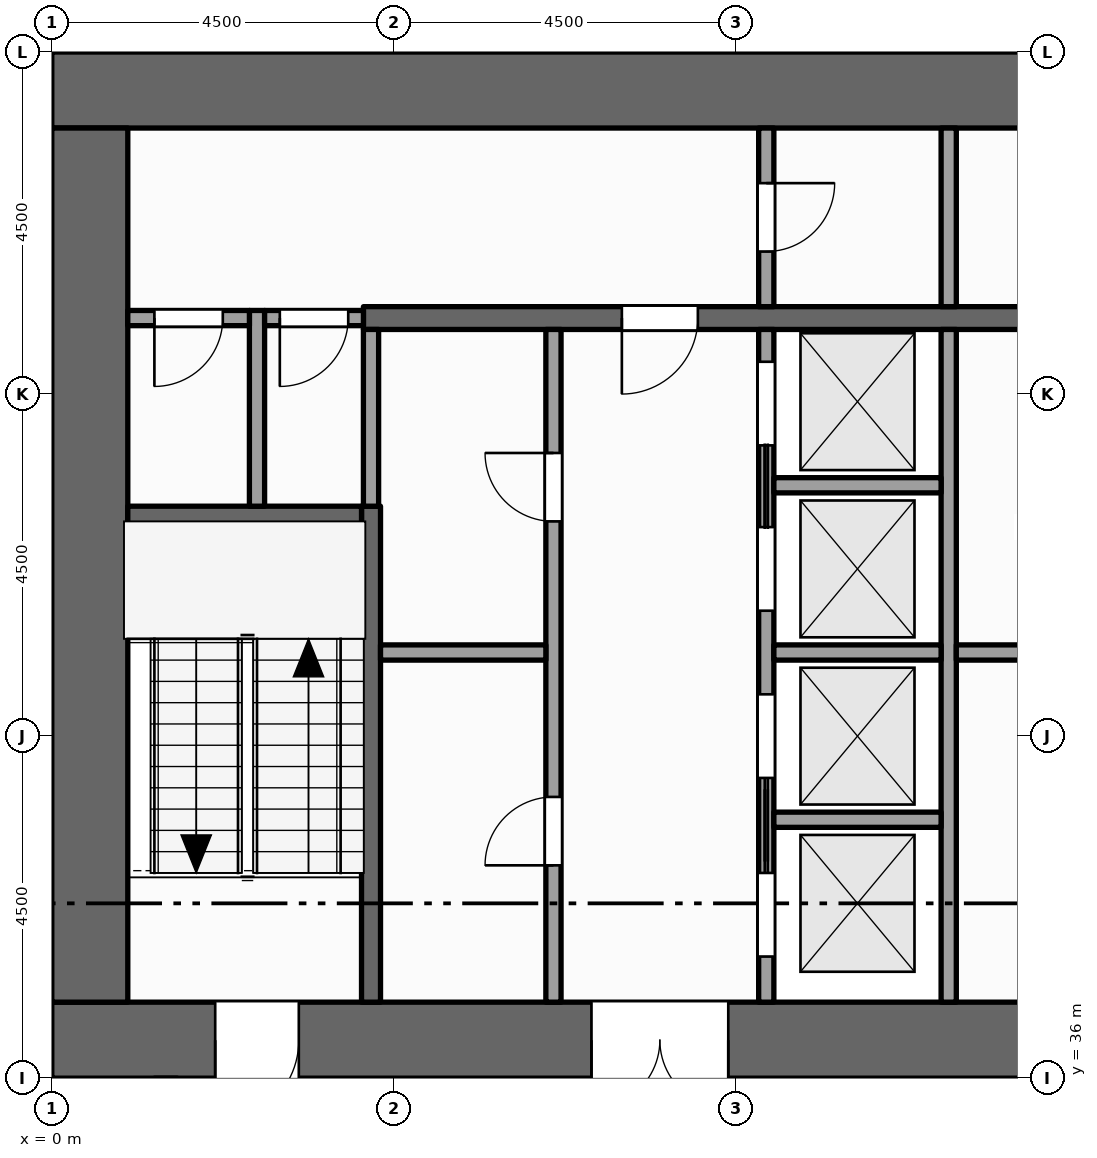
"""IFC4 building model, lengths in metres.
Left out: names, types, materials, properties, quantities, classifications, styles, units other than length and angle.
Written with IfcOpenShell. Run it as: python <this file> out.ifc"""

import sys

from ifc_helpers import new_model, si_unit, direction, frame, frame_2d, origin, place, context, subcontext, project, spatial, rectangle, extrude, element, fill, save


model = new_model("IFC4")
c1 = context("Model", 3, precision=1e-05, world=origin(), true_north=direction((0.0, 1.0)))
c2 = subcontext(c1, "Body", "Model", "MODEL_VIEW")
j1 = project(units=[si_unit("LENGTHUNIT", "METRE"), si_unit("PLANEANGLEUNIT", "RADIAN")], contexts=[c1])
p1 = place(None, origin())
s1 = spatial("IfcSite", under=j1, at=p1, CompositionType="ELEMENT")
p2 = place(p1, origin())
s2 = spatial("IfcBuilding", under=s1, at=p2, CompositionType="ELEMENT")
p3 = place(p2, frame((0.0, 0.0, 199.0)))
s3 = spatial("IfcBuildingStorey", under=s2, at=p3, CompositionType="ELEMENT", Elevation=199.0)
p4 = place(p3, frame((0.0, 36.5, -0.15), z_axis=(0.0, 0.0, 1.0), x_axis=(1.0, 0.0, 0.0)))
e1 = element("IfcWall", 1, at=p4, inside=s3, PredefinedType="SHEAR", context=c2, shape_type="SweptSolid", body=[
    extrude(rectangle(XDim=22.5, YDim=1.0, at=frame_2d((11.25, 0.0))), origin(), (0.0, 0.0, 1.0), 4.0),
])
p5 = place(p4, frame((7.1, 0.0, 0.15)))
e2 = element("IfcOpeningElement", 2, at=p5, cuts=e1, PredefinedType="OPENING", context=c2, shape_type="SweptSolid", body=[
    extrude(rectangle(XDim=1.8, YDim=2.1, at=frame_2d((0.9, 1.05))), frame((0.0, 0.51, 0.0), z_axis=(0.0, -1.0, 0.0), x_axis=(1.0, 0.0, 0.0)), (0.0, 0.0, 1.0), 1.02),
])
p6 = place(p4, frame((13.15, 0.0, 0.15)))
e3 = element("IfcOpeningElement", 3, at=p6, cuts=e1, PredefinedType="OPENING", context=c2, shape_type="SweptSolid", body=[
    extrude(rectangle(XDim=1.1, YDim=2.1, at=frame_2d((0.55, 1.05))), frame((0.0, 0.51, 0.0), z_axis=(0.0, -1.0, 0.0), x_axis=(1.0, 0.0, 0.0)), (0.0, 0.0, 1.0), 1.02),
])
p7 = place(p4, frame((2.15, 0.0, 0.15)))
e4 = element("IfcOpeningElement", 4, at=p7, cuts=e1, PredefinedType="OPENING", context=c2, shape_type="SweptSolid", body=[
    extrude(rectangle(XDim=1.1, YDim=2.1, at=frame_2d((0.55, 1.05))), frame((0.0, 0.51, 0.0), z_axis=(0.0, -1.0, 0.0), x_axis=(1.0, 0.0, 0.0)), (0.0, 0.0, 1.0), 1.02),
])
p8 = place(p4, frame((19.35, 0.0, 0.15)))
e5 = element("IfcOpeningElement", 5, at=p8, cuts=e1, PredefinedType="OPENING", context=c2, shape_type="SweptSolid", body=[
    extrude(rectangle(XDim=1.1, YDim=2.1, at=frame_2d((0.55, 1.05))), frame((0.0, 0.51, 0.0), z_axis=(0.0, -1.0, 0.0), x_axis=(1.0, 0.0, 0.0)), (0.0, 0.0, 1.0), 1.02),
])
p9 = place(p3, frame((0.0, 49.0, -0.15), z_axis=(0.0, 0.0, 1.0), x_axis=(1.0, 0.0, 0.0)))
e6 = element("IfcWall", 6, at=p9, inside=s3, PredefinedType="SHEAR", context=c2, shape_type="SweptSolid", body=[
    extrude(rectangle(XDim=22.5, YDim=1.0, at=frame_2d((11.25, 0.0))), origin(), (0.0, 0.0, 1.0), 4.0),
])
p10 = place(p3, frame((0.5, 37.0, -0.15), z_axis=(0.0, 0.0, 1.0), x_axis=(0.0, 1.0, 0.0)))
e7 = element("IfcWall", 7, at=p10, inside=s3, PredefinedType="SHEAR", context=c2, shape_type="SweptSolid", body=[
    extrude(rectangle(XDim=11.5, YDim=1.0, at=frame_2d((5.75, 0.0))), origin(), (0.0, 0.0, 1.0), 4.0),
])
p11 = place(p3, frame((2.7, 43.525, 0.0), z_axis=(0.0, 0.0, 1.0), x_axis=(0.0, 1.0, 0.0)))
e8 = element("IfcWall", 8, at=p11, inside=s3, PredefinedType="PARTITIONING", context=c2, shape_type="SweptSolid", body=[
    extrude(rectangle(XDim=2.575, YDim=0.2, at=frame_2d((1.288, 0.0))), origin(), (0.0, 0.0, 1.0), 3.85),
])
p12 = place(p3, frame((4.2, 37.0, 0.0), z_axis=(0.0, 0.0, 1.0), x_axis=(0.0, 1.0, 0.0)))
e9 = element("IfcWall", 9, at=p12, inside=s3, PredefinedType="SHEAR", context=c2, shape_type="SweptSolid", body=[
    extrude(rectangle(XDim=6.525, YDim=0.25, at=frame_2d((3.262, 0.0))), origin(), (0.0, 0.0, 1.0), 3.85),
])
p13 = place(p3, frame((4.2, 43.525, 0.0), z_axis=(0.0, 0.0, 1.0), x_axis=(0.0, 1.0, 0.0)))
e10 = element("IfcWall", 10, at=p13, inside=s3, PredefinedType="PARTITIONING", context=c2, shape_type="SweptSolid", body=[
    extrude(rectangle(XDim=2.325, YDim=0.2, at=frame_2d((1.163, 0.0))), origin(), (0.0, 0.0, 1.0), 3.85),
])
p14 = place(p3, frame((6.6, 37.0, 0.0), z_axis=(0.0, 0.0, 1.0), x_axis=(0.0, 1.0, 0.0)))
e11 = element("IfcWall", 11, at=p14, inside=s3, PredefinedType="PARTITIONING", context=c2, shape_type="SweptSolid", body=[
    extrude(rectangle(XDim=8.85, YDim=0.2, at=frame_2d((4.425, 0.0))), origin(), (0.0, 0.0, 1.0), 3.85),
])
p15 = place(p14, frame((1.8, 0.0, 0.0)))
e12 = element("IfcOpeningElement", 12, at=p15, cuts=e11, PredefinedType="OPENING", context=c2, shape_type="SweptSolid", body=[
    extrude(rectangle(XDim=0.9, YDim=2.1, at=frame_2d((0.45, 1.05))), frame((0.0, 0.11, 0.0), z_axis=(0.0, -1.0, 0.0), x_axis=(1.0, 0.0, 0.0)), (0.0, 0.0, 1.0), 0.22),
])
p16 = place(p14, frame((6.325, 0.0, 0.0)))
e13 = element("IfcOpeningElement", 13, at=p16, cuts=e11, PredefinedType="OPENING", context=c2, shape_type="SweptSolid", body=[
    extrude(rectangle(XDim=0.9, YDim=2.1, at=frame_2d((0.45, 1.05))), frame((0.0, 0.11, 0.0), z_axis=(0.0, -1.0, 0.0), x_axis=(1.0, 0.0, 0.0)), (0.0, 0.0, 1.0), 0.22),
])
p17 = place(p3, frame((9.4, 37.0, 0.0), z_axis=(0.0, 0.0, 1.0), x_axis=(0.0, 1.0, 0.0)))
e14 = element("IfcWall", 14, at=p17, inside=s3, PredefinedType="SOLIDWALL", context=c2, shape_type="SweptSolid", body=[
    extrude(rectangle(XDim=8.85, YDim=0.2, at=frame_2d((4.425, 0.0))), origin(), (0.0, 0.0, 1.0), 3.85),
])
p18 = place(p17, frame((0.6, 0.0, 0.012)))
e15 = element("IfcOpeningElement", 15, at=p18, cuts=e14, PredefinedType="OPENING", context=c2, shape_type="SweptSolid", body=[
    extrude(rectangle(XDim=1.1, YDim=2.1, at=frame_2d((0.55, 1.05))), frame((0.0, 0.11, 0.0), z_axis=(0.0, -1.0, 0.0), x_axis=(1.0, 0.0, 0.0)), (0.0, 0.0, 1.0), 0.22),
])
p19 = place(p17, frame((2.95, 0.0, 0.012)))
e16 = element("IfcOpeningElement", 16, at=p19, cuts=e14, PredefinedType="OPENING", context=c2, shape_type="SweptSolid", body=[
    extrude(rectangle(XDim=1.1, YDim=2.1, at=frame_2d((0.55, 1.05))), frame((0.0, 0.11, 0.0), z_axis=(0.0, -1.0, 0.0), x_axis=(1.0, 0.0, 0.0)), (0.0, 0.0, 1.0), 0.22),
])
p20 = place(p17, frame((5.15, 0.0, 0.012)))
e17 = element("IfcOpeningElement", 17, at=p20, cuts=e14, PredefinedType="OPENING", context=c2, shape_type="SweptSolid", body=[
    extrude(rectangle(XDim=1.1, YDim=2.1, at=frame_2d((0.55, 1.05))), frame((0.0, 0.11, 0.0), z_axis=(0.0, -1.0, 0.0), x_axis=(1.0, 0.0, 0.0)), (0.0, 0.0, 1.0), 0.22),
])
p21 = place(p17, frame((7.325, 0.0, 0.012)))
e18 = element("IfcOpeningElement", 18, at=p21, cuts=e14, PredefinedType="OPENING", context=c2, shape_type="SweptSolid", body=[
    extrude(rectangle(XDim=1.1, YDim=2.1, at=frame_2d((0.55, 1.05))), frame((0.0, 0.11, 0.0), z_axis=(0.0, -1.0, 0.0), x_axis=(1.0, 0.0, 0.0)), (0.0, 0.0, 1.0), 0.22),
])
p22 = place(p3, frame((9.4, 46.15, 0.0), z_axis=(0.0, 0.0, 1.0), x_axis=(0.0, 1.0, 0.0)))
e19 = element("IfcWall", 19, at=p22, inside=s3, PredefinedType="PARTITIONING", context=c2, shape_type="SweptSolid", body=[
    extrude(rectangle(XDim=2.35, YDim=0.2, at=frame_2d((1.175, 0.0))), origin(), (0.0, 0.0, 1.0), 3.85),
])
p23 = place(p22, frame((0.725, 0.0, 0.0)))
e20 = element("IfcOpeningElement", 20, at=p23, cuts=e19, PredefinedType="OPENING", context=c2, shape_type="SweptSolid", body=[
    extrude(rectangle(XDim=0.9, YDim=2.1, at=frame_2d((0.45, 1.05))), frame((0.0, 0.11, 0.0), z_axis=(0.0, -1.0, 0.0), x_axis=(1.0, 0.0, 0.0)), (0.0, 0.0, 1.0), 0.22),
])
p24 = place(p3, frame((11.8, 37.0, 0.0), z_axis=(0.0, 0.0, 1.0), x_axis=(0.0, 1.0, 0.0)))
e21 = element("IfcWall", 21, at=p24, inside=s3, PredefinedType="SOLIDWALL", context=c2, shape_type="SweptSolid", body=[
    extrude(rectangle(XDim=8.85, YDim=0.2, at=frame_2d((4.425, 0.0))), origin(), (0.0, 0.0, 1.0), 3.85),
])
p25 = place(p3, frame((11.8, 46.15, 0.0), z_axis=(0.0, 0.0, 1.0), x_axis=(0.0, 1.0, 0.0)))
e22 = element("IfcWall", 22, at=p25, inside=s3, PredefinedType="PARTITIONING", context=c2, shape_type="SweptSolid", body=[
    extrude(rectangle(XDim=2.35, YDim=0.2, at=frame_2d((1.175, 0.0))), origin(), (0.0, 0.0, 1.0), 3.85),
])
p26 = place(p3, frame((9.5, 39.4, 0.0), z_axis=(0.0, 0.0, 1.0), x_axis=(1.0, 0.0, 0.0)))
e23 = element("IfcWall", 23, at=p26, inside=s3, PredefinedType="SOLIDWALL", context=c2, shape_type="SweptSolid", body=[
    extrude(rectangle(XDim=2.2, YDim=0.2, at=frame_2d((1.1, 0.0))), origin(), (0.0, 0.0, 1.0), 3.85),
])
p27 = place(p3, frame((4.325, 41.6, 0.0), z_axis=(0.0, 0.0, 1.0), x_axis=(1.0, 0.0, 0.0)))
e24 = element("IfcWall", 24, at=p27, inside=s3, PredefinedType="PARTITIONING", context=c2, shape_type="SweptSolid", body=[
    extrude(rectangle(XDim=2.175, YDim=0.2, at=frame_2d((1.087, 0.0))), origin(), (0.0, 0.0, 1.0), 3.85),
])
p28 = place(p3, frame((9.5, 41.6, 0.0), z_axis=(0.0, 0.0, 1.0), x_axis=(1.0, 0.0, 0.0)))
e25 = element("IfcWall", 25, at=p28, inside=s3, PredefinedType="SOLIDWALL", context=c2, shape_type="SweptSolid", body=[
    extrude(rectangle(XDim=2.2, YDim=0.2, at=frame_2d((1.1, 0.0))), origin(), (0.0, 0.0, 1.0), 3.85),
])
p29 = place(p3, frame((11.9, 41.6, 0.0), z_axis=(0.0, 0.0, 1.0), x_axis=(1.0, 0.0, 0.0)))
e26 = element("IfcWall", 26, at=p29, inside=s3, PredefinedType="PARTITIONING", context=c2, shape_type="SweptSolid", body=[
    extrude(rectangle(XDim=3.6, YDim=0.2, at=frame_2d((1.8, 0.0))), origin(), (0.0, 0.0, 1.0), 3.85),
])
p30 = place(p29, frame((1.3, 0.0, 0.0)))
e27 = element("IfcOpeningElement", 27, at=p30, cuts=e26, PredefinedType="OPENING", context=c2, shape_type="SweptSolid", body=[
    extrude(rectangle(XDim=1.0, YDim=2.1, at=frame_2d((0.5, 1.05))), frame((0.0, 0.11, 0.0), z_axis=(0.0, -1.0, 0.0), x_axis=(1.0, 0.0, 0.0)), (0.0, 0.0, 1.0), 0.22),
])
p31 = place(p3, frame((1.0, 43.4, 0.0), z_axis=(0.0, 0.0, 1.0), x_axis=(1.0, 0.0, 0.0)))
e28 = element("IfcWall", 28, at=p31, inside=s3, PredefinedType="SHEAR", context=c2, shape_type="SweptSolid", body=[
    extrude(rectangle(XDim=3.075, YDim=0.25, at=frame_2d((1.538, 0.0))), origin(), (0.0, 0.0, 1.0), 3.85),
])
p32 = place(p3, frame((9.5, 43.8, 0.0), z_axis=(0.0, 0.0, 1.0), x_axis=(1.0, 0.0, 0.0)))
e29 = element("IfcWall", 29, at=p32, inside=s3, PredefinedType="SOLIDWALL", context=c2, shape_type="SweptSolid", body=[
    extrude(rectangle(XDim=2.2, YDim=0.2, at=frame_2d((1.1, 0.0))), origin(), (0.0, 0.0, 1.0), 3.85),
])
p33 = place(p3, frame((1.0, 46.0, 0.0), z_axis=(0.0, 0.0, 1.0), x_axis=(1.0, 0.0, 0.0)))
e30 = element("IfcWall", 30, at=p33, inside=s3, PredefinedType="PARTITIONING", context=c2, shape_type="SweptSolid", body=[
    extrude(rectangle(XDim=1.6, YDim=0.2, at=frame_2d((0.8, 0.0))), origin(), (0.0, 0.0, 1.0), 3.85),
])
p34 = place(p33, frame((0.35, 0.0, 0.0)))
e31 = element("IfcOpeningElement", 31, at=p34, cuts=e30, PredefinedType="OPENING", context=c2, shape_type="SweptSolid", body=[
    extrude(rectangle(XDim=0.9, YDim=2.1, at=frame_2d((0.45, 1.05))), frame((0.0, 0.11, 0.0), z_axis=(0.0, -1.0, 0.0), x_axis=(1.0, 0.0, 0.0)), (0.0, 0.0, 1.0), 0.22),
])
p35 = place(p3, frame((2.8, 46.0, 0.0), z_axis=(0.0, 0.0, 1.0), x_axis=(1.0, 0.0, 0.0)))
e32 = element("IfcWall", 32, at=p35, inside=s3, PredefinedType="PARTITIONING", context=c2, shape_type="SweptSolid", body=[
    extrude(rectangle(XDim=1.3, YDim=0.2, at=frame_2d((0.65, 0.0))), origin(), (0.0, 0.0, 1.0), 3.85),
])
p36 = place(p35, frame((0.2, 0.0, 0.0)))
e33 = element("IfcOpeningElement", 33, at=p36, cuts=e32, PredefinedType="OPENING", context=c2, shape_type="SweptSolid", body=[
    extrude(rectangle(XDim=0.9, YDim=2.1, at=frame_2d((0.45, 1.05))), frame((0.0, 0.11, 0.0), z_axis=(0.0, -1.0, 0.0), x_axis=(1.0, 0.0, 0.0)), (0.0, 0.0, 1.0), 0.22),
])
p37 = place(p3, frame((4.1, 46.0, 0.0), z_axis=(0.0, 0.0, 1.0), x_axis=(1.0, 0.0, 0.0)))
e34 = element("IfcWall", 34, at=p37, inside=s3, PredefinedType="SHEAR", context=c2, shape_type="SweptSolid", body=[
    extrude(rectangle(XDim=14.5, YDim=0.3, at=frame_2d((7.25, 0.0))), origin(), (0.0, 0.0, 1.0), 3.85),
])
p38 = place(p37, frame((3.4, 0.0, 0.0)))
e35 = element("IfcOpeningElement", 35, at=p38, cuts=e34, PredefinedType="OPENING", context=c2, shape_type="SweptSolid", body=[
    extrude(rectangle(XDim=1.0, YDim=2.1, at=frame_2d((0.5, 1.05))), frame((0.0, 0.16, 0.0), z_axis=(0.0, -1.0, 0.0), x_axis=(1.0, 0.0, 0.0)), (0.0, 0.0, 1.0), 0.32),
])
p39 = place(p37, frame((9.1, 0.0, 0.0)))
e36 = element("IfcOpeningElement", 36, at=p39, cuts=e34, PredefinedType="OPENING", context=c2, shape_type="SweptSolid", body=[
    extrude(rectangle(XDim=1.0, YDim=2.1, at=frame_2d((0.5, 1.05))), frame((0.0, 0.16, 0.0), z_axis=(0.0, -1.0, 0.0), x_axis=(1.0, 0.0, 0.0)), (0.0, 0.0, 1.0), 0.32),
])
p40 = place(p18, origin())
e37 = element("IfcDoor", 37, at=p40, inside=s3, OperationType="SLIDING_TO_RIGHT", PredefinedType="DOOR", context=c2, shape_type="SweptSolid", body=[
    extrude(rectangle(XDim=1.1, YDim=2.1, at=frame_2d((0.55, 1.05))), frame((0.0, 0.025, 0.0), z_axis=(0.0, -1.0, 0.0), x_axis=(1.0, 0.0, 0.0)), (0.0, 0.0, 1.0), 0.05),
])
fill(e15, e37)
p41 = place(p19, origin())
e38 = element("IfcDoor", 38, at=p41, inside=s3, OperationType="SLIDING_TO_LEFT", PredefinedType="DOOR", context=c2, shape_type="SweptSolid", body=[
    extrude(rectangle(XDim=1.1, YDim=2.1, at=frame_2d((0.55, 1.05))), frame((0.0, 0.025, 0.0), z_axis=(0.0, -1.0, 0.0), x_axis=(1.0, 0.0, 0.0)), (0.0, 0.0, 1.0), 0.05),
])
fill(e16, e38)
p42 = place(p20, origin())
e39 = element("IfcDoor", 39, at=p42, inside=s3, OperationType="SLIDING_TO_RIGHT", PredefinedType="DOOR", context=c2, shape_type="SweptSolid", body=[
    extrude(rectangle(XDim=1.1, YDim=2.1, at=frame_2d((0.55, 1.05))), frame((0.0, 0.025, 0.0), z_axis=(0.0, -1.0, 0.0), x_axis=(1.0, 0.0, 0.0)), (0.0, 0.0, 1.0), 0.05),
])
fill(e17, e39)
p43 = place(p21, origin())
e40 = element("IfcDoor", 40, at=p43, inside=s3, OperationType="SLIDING_TO_LEFT", PredefinedType="DOOR", context=c2, shape_type="SweptSolid", body=[
    extrude(rectangle(XDim=1.1, YDim=2.1, at=frame_2d((0.55, 1.05))), frame((0.0, 0.025, 0.0), z_axis=(0.0, -1.0, 0.0), x_axis=(1.0, 0.0, 0.0)), (0.0, 0.0, 1.0), 0.05),
])
fill(e18, e40)
p44 = place(p5, origin())
e41 = element("IfcDoor", 41, at=p44, inside=s3, OperationType="DOUBLE_DOOR_SINGLE_SWING", PredefinedType="DOOR", context=c2, shape_type="SweptSolid", body=[
    extrude(rectangle(XDim=1.8, YDim=2.1, at=frame_2d((0.9, 1.05))), frame((0.0, 0.025, 0.0), z_axis=(0.0, -1.0, 0.0), x_axis=(1.0, 0.0, 0.0)), (0.0, 0.0, 1.0), 0.05),
])
fill(e2, e41)
p45 = place(p38, origin())
e42 = element("IfcDoor", 42, at=p45, inside=s3, OperationType="SINGLE_SWING_LEFT", PredefinedType="DOOR", context=c2, shape_type="SweptSolid", body=[
    extrude(rectangle(XDim=1.0, YDim=2.1, at=frame_2d((0.5, 1.05))), frame((0.0, 0.025, 0.0), z_axis=(0.0, -1.0, 0.0), x_axis=(1.0, 0.0, 0.0)), (0.0, 0.0, 1.0), 0.05),
])
fill(e35, e42)
p46 = place(p23, origin())
e43 = element("IfcDoor", 43, at=p46, inside=s3, OperationType="SINGLE_SWING_RIGHT", PredefinedType="DOOR", context=c2, shape_type="SweptSolid", body=[
    extrude(rectangle(XDim=0.9, YDim=2.1, at=frame_2d((0.45, 1.05))), frame((0.0, 0.025, 0.0), z_axis=(0.0, -1.0, 0.0), x_axis=(1.0, 0.0, 0.0)), (0.0, 0.0, 1.0), 0.05),
])
fill(e20, e43)
p47 = place(p7, origin())
e44 = element("IfcDoor", 44, at=p47, inside=s3, OperationType="SINGLE_SWING_LEFT", PredefinedType="DOOR", context=c2, shape_type="SweptSolid", body=[
    extrude(rectangle(XDim=1.1, YDim=2.1, at=frame_2d((0.55, 1.05))), frame((0.0, 0.025, 0.0), z_axis=(0.0, -1.0, 0.0), x_axis=(1.0, 0.0, 0.0)), (0.0, 0.0, 1.0), 0.05),
])
fill(e4, e44)
p48 = place(p34, origin())
e45 = element("IfcDoor", 45, at=p48, inside=s3, OperationType="SINGLE_SWING_LEFT", PredefinedType="DOOR", context=c2, shape_type="SweptSolid", body=[
    extrude(rectangle(XDim=0.9, YDim=2.1, at=frame_2d((0.45, 1.05))), frame((0.0, 0.025, 0.0), z_axis=(0.0, -1.0, 0.0), x_axis=(1.0, 0.0, 0.0)), (0.0, 0.0, 1.0), 0.05),
])
fill(e31, e45)
p49 = place(p36, origin())
e46 = element("IfcDoor", 46, at=p49, inside=s3, OperationType="SINGLE_SWING_LEFT", PredefinedType="DOOR", context=c2, shape_type="SweptSolid", body=[
    extrude(rectangle(XDim=0.9, YDim=2.1, at=frame_2d((0.45, 1.05))), frame((0.0, 0.025, 0.0), z_axis=(0.0, -1.0, 0.0), x_axis=(1.0, 0.0, 0.0)), (0.0, 0.0, 1.0), 0.05),
])
fill(e33, e46)
p50 = place(p15, origin())
e47 = element("IfcDoor", 47, at=p50, inside=s3, OperationType="SINGLE_SWING_LEFT", PredefinedType="DOOR", context=c2, shape_type="SweptSolid", body=[
    extrude(rectangle(XDim=0.9, YDim=2.1, at=frame_2d((0.45, 1.05))), frame((0.0, 0.025, 0.0), z_axis=(0.0, -1.0, 0.0), x_axis=(1.0, 0.0, 0.0)), (0.0, 0.0, 1.0), 0.05),
])
fill(e12, e47)
p51 = place(p16, origin())
e48 = element("IfcDoor", 48, at=p51, inside=s3, OperationType="SINGLE_SWING_RIGHT", PredefinedType="DOOR", context=c2, shape_type="SweptSolid", body=[
    extrude(rectangle(XDim=0.9, YDim=2.1, at=frame_2d((0.45, 1.05))), frame((0.0, 0.025, 0.0), z_axis=(0.0, -1.0, 0.0), x_axis=(1.0, 0.0, 0.0)), (0.0, 0.0, 1.0), 0.05),
])
fill(e13, e48)
save(model, sys.argv[1])
